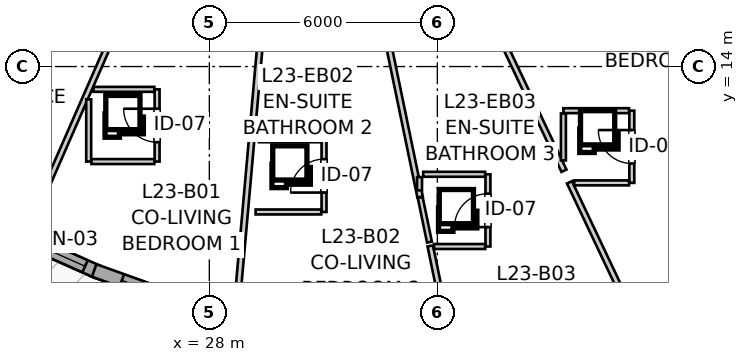
"""IFC4 building model, lengths in metres.
Left out: names, types, materials, properties, quantities, classifications, styles, units other than length and angle.
Written with IfcOpenShell. Run it as: python <this file> out.ifc"""

import sys

from ifc_helpers import new_model, si_unit, direction, frame, frame_2d, origin, place, context, subcontext, project, spatial, rectangle, extrude, source, transform, mapped, element, fill, save


model = new_model("IFC4")
c1 = context("Model", 3, precision=1e-05, world=origin(), true_north=direction((0.0, 1.0)))
c2 = subcontext(c1, "Body", "Model", "MODEL_VIEW")
j1 = project(units=[si_unit("LENGTHUNIT", "METRE"), si_unit("PLANEANGLEUNIT", "RADIAN")], contexts=[c1])
p1 = place(None, origin())
s1 = spatial("IfcSite", under=j1, at=p1, CompositionType="ELEMENT")
p2 = place(p1, origin())
s2 = spatial("IfcBuilding", under=s1, at=p2, CompositionType="ELEMENT")
p3 = place(p2, frame((0.0, 0.0, 80.0)))
s3 = spatial("IfcBuildingStorey", under=s2, at=p3, CompositionType="ELEMENT", Elevation=80.0)
p4 = place(p3, frame((22.503, 9.737, 0.0), z_axis=(0.0, 0.0, 1.0), x_axis=(0.913443049169, -0.406966578388, 0.0)))
e1 = element("IfcWall", 1, at=p4, inside=s3, PredefinedType="SOLIDWALL", context=c2, shape_type="SweptSolid", body=[
    extrude(rectangle(XDim=2.79, YDim=0.35, at=frame_2d((1.395, 0.0))), origin(), (0.0, 0.0, 1.0), 2.465),
])
p5 = place(p4, frame((0.938, 0.0, 0.82)))
e2 = element("IfcOpeningElement", 2, at=p5, cuts=e1, PredefinedType="OPENING", context=c2, shape_type="SweptSolid", body=[
    extrude(rectangle(XDim=1.5, YDim=1.45, at=frame_2d((0.75, 0.725))), frame((0.0, 0.185, 0.0), z_axis=(0.0, -1.0, 0.0), x_axis=(1.0, 0.0, 0.0)), (0.0, 0.0, 1.0), 0.37),
])
p6 = place(p3, frame((24.969, 8.635, 0.0), z_axis=(0.0, 0.0, 1.0), x_axis=(0.941099972293, -0.338128440315, 0.0)))
e3 = element("IfcWall", 3, at=p6, inside=s3, PredefinedType="SOLIDWALL", context=c2, shape_type="SweptSolid", body=[
    extrude(rectangle(XDim=3.028, YDim=0.35, at=frame_2d((1.514, 0.0))), origin(), (0.0, 0.0, 1.0), 2.465),
])
p7 = place(p6, frame((0.774, 0.0, 0.82)))
e4 = element("IfcOpeningElement", 4, at=p7, cuts=e3, PredefinedType="OPENING", context=c2, shape_type="SweptSolid", body=[
    extrude(rectangle(XDim=1.5, YDim=1.45, at=frame_2d((0.75, 0.725))), frame((0.0, 0.185, 0.0), z_axis=(0.0, -1.0, 0.0), x_axis=(1.0, 0.0, 0.0)), (0.0, 0.0, 1.0), 0.37),
])
p8 = place(p3, frame((26.625, 11.5, 0.0), z_axis=(0.0, 0.0, 1.0), x_axis=(0.0, 1.0, 0.0)))
e5 = element("IfcWall", 5, at=p8, inside=s3, PredefinedType="PARTITIONING", context=c2, shape_type="SweptSolid", body=[
    extrude(rectangle(XDim=1.9, YDim=0.13, at=frame_2d((0.95, 0.0))), origin(), (0.0, 0.0, 1.0), 2.935),
])
p9 = place(p8, frame((0.51, 0.0, 0.0)))
e6 = element("IfcOpeningElement", 6, at=p9, cuts=e5, PredefinedType="OPENING", context=c2, shape_type="SweptSolid", body=[
    extrude(rectangle(XDim=0.88, YDim=2.05, at=frame_2d((0.44, 1.025))), frame((0.0, 0.075, 0.0), z_axis=(0.0, -1.0, 0.0), x_axis=(1.0, 0.0, 0.0)), (0.0, 0.0, 1.0), 0.15),
])
p10 = place(p3, frame((31.018, 10.174, 0.0), z_axis=(0.0, 0.0, 1.0), x_axis=(0.0, 1.0, 0.0)))
e7 = element("IfcWall", 7, at=p10, inside=s3, PredefinedType="PARTITIONING", context=c2, shape_type="SweptSolid", body=[
    extrude(rectangle(XDim=1.9, YDim=0.13, at=frame_2d((0.95, 0.0))), origin(), (0.0, 0.0, 1.0), 2.935),
])
p11 = place(p10, frame((0.51, 0.0, 0.0)))
e8 = element("IfcOpeningElement", 8, at=p11, cuts=e7, PredefinedType="OPENING", context=c2, shape_type="SweptSolid", body=[
    extrude(rectangle(XDim=0.88, YDim=2.05, at=frame_2d((0.44, 1.025))), frame((0.0, 0.075, 0.0), z_axis=(0.0, -1.0, 0.0), x_axis=(1.0, 0.0, 0.0)), (0.0, 0.0, 1.0), 0.15),
])
p12 = place(p3, frame((39.117, 10.939, 0.0), z_axis=(0.0, 0.0, 1.0), x_axis=(0.0, 1.0, 0.0)))
e9 = element("IfcWall", 9, at=p12, inside=s3, PredefinedType="PARTITIONING", context=c2, shape_type="SweptSolid", body=[
    extrude(rectangle(XDim=1.9, YDim=0.13, at=frame_2d((0.95, 0.0))), origin(), (0.0, 0.0, 1.0), 2.935),
])
p13 = place(p12, frame((0.51, 0.0, 0.0)))
e10 = element("IfcOpeningElement", 10, at=p13, cuts=e9, PredefinedType="OPENING", context=c2, shape_type="SweptSolid", body=[
    extrude(rectangle(XDim=0.88, YDim=2.05, at=frame_2d((0.44, 1.025))), frame((0.0, 0.075, 0.0), z_axis=(0.0, -1.0, 0.0), x_axis=(1.0, 0.0, 0.0)), (0.0, 0.0, 1.0), 0.15),
])
p14 = place(p3, frame((35.331, 9.265, 0.0), z_axis=(0.0, 0.0, 1.0), x_axis=(0.0, 1.0, 0.0)))
e11 = element("IfcWall", 11, at=p14, inside=s3, PredefinedType="PARTITIONING", context=c2, shape_type="SweptSolid", body=[
    extrude(rectangle(XDim=1.9, YDim=0.13, at=frame_2d((0.95, 0.0))), origin(), (0.0, 0.0, 1.0), 2.935),
])
p15 = place(p14, frame((0.51, 0.0, 0.0)))
e12 = element("IfcOpeningElement", 12, at=p15, cuts=e11, PredefinedType="OPENING", context=c2, shape_type="SweptSolid", body=[
    extrude(rectangle(XDim=0.88, YDim=2.05, at=frame_2d((0.44, 1.025))), frame((0.0, 0.075, 0.0), z_axis=(0.0, -1.0, 0.0), x_axis=(1.0, 0.0, 0.0)), (0.0, 0.0, 1.0), 0.15),
])
p16 = place(p3, frame((28.711, 7.564, 0.0), z_axis=(0.0, 0.0, 1.0), x_axis=(0.088615013812, 0.996065951294, 0.0)))
e13 = element("IfcWall", 13, at=p16, inside=s3, PredefinedType="PARTITIONING", context=c2, shape_type="SweptSolid", body=[
    extrude(rectangle(XDim=7.943, YDim=0.145, at=frame_2d((3.971, 0.0))), origin(), (0.0, 0.0, 1.0), 2.935),
])
p17 = place(p3, frame((23.186, 9.634, 0.0), z_axis=(0.0, 0.0, 1.0), x_axis=(0.400994208685, 0.916080588486, 0.0)))
e14 = element("IfcWall", 14, at=p17, inside=s3, PredefinedType="PARTITIONING", context=c2, shape_type="SweptSolid", body=[
    extrude(rectangle(XDim=6.353, YDim=0.145, at=frame_2d((3.177, 0.0))), origin(), (0.0, 0.0, 1.0), 2.935),
])
p18 = place(p3, frame((38.667, 17.429, 0.0), z_axis=(0.0, 0.0, 1.0), x_axis=(0.696417222112, -0.717637131666, 0.0)))
e15 = element("IfcWall", 15, at=p18, inside=s3, PredefinedType="PARTITIONING", context=c2, shape_type="SweptSolid", body=[
    extrude(rectangle(XDim=6.04, YDim=0.145, at=frame_2d((3.02, 0.0))), origin(), (0.0, 0.0, 1.0), 2.935),
])
p19 = place(p3, frame((32.531, 15.468, 0.0), z_axis=(0.0, 0.0, 1.0), x_axis=(0.202792769077, -0.979221677053, 0.0)))
e16 = element("IfcWall", 16, at=p19, inside=s3, PredefinedType="PARTITIONING", context=c2, shape_type="SweptSolid", body=[
    extrude(rectangle(XDim=5.003, YDim=0.145, at=frame_2d((2.502, 0.0))), origin(), (0.0, 0.0, 1.0), 2.935),
])
p20 = place(p3, frame((37.476, 10.954, 0.0), z_axis=(0.0, 0.0, 1.0), x_axis=(0.428094746621, -0.903733859007, 0.0)))
e17 = element("IfcWall", 17, at=p20, inside=s3, PredefinedType="PARTITIONING", context=c2, shape_type="SweptSolid", body=[
    extrude(rectangle(XDim=4.996, YDim=0.145, at=frame_2d((2.498, 0.0))), origin(), (0.0, 0.0, 1.0), 2.935),
])
p21 = place(p3, frame((35.346, 15.452, 0.0), z_axis=(0.0, 0.0, 1.0), x_axis=(0.428023015228, -0.903767834366, 0.0)))
e18 = element("IfcWall", 18, at=p21, inside=s3, PredefinedType="PARTITIONING", context=c2, shape_type="SweptSolid", body=[
    extrude(rectangle(XDim=4.64, YDim=0.145, at=frame_2d((2.32, 0.0))), origin(), (0.0, 0.0, 1.0), 2.935),
])
p22 = place(p3, frame((33.813, 9.28, 0.0), z_axis=(0.0, 0.0, 1.0), x_axis=(0.202648062782, -0.979251633979, 0.0)))
e19 = element("IfcWall", 19, at=p22, inside=s3, PredefinedType="PARTITIONING", context=c2, shape_type="SweptSolid", body=[
    extrude(rectangle(XDim=3.232, YDim=0.145, at=frame_2d((1.616, 0.0))), origin(), (0.0, 0.0, 1.0), 2.935),
])
p23 = place(p3, frame((24.825, 11.5, 0.0), z_axis=(0.0, 0.0, 1.0), x_axis=(0.0, 1.0, 0.0)))
e20 = element("IfcWall", 20, at=p23, inside=s3, PredefinedType="PARTITIONING", context=c2, shape_type="SweptSolid", body=[
    extrude(rectangle(XDim=1.637, YDim=0.13, at=frame_2d((0.818, 0.0))), origin(), (0.0, 0.0, 1.0), 2.935),
])
p24 = place(p3, frame((33.626, 11.165, 0.0), z_axis=(0.0, 0.0, 1.0), x_axis=(1.0, 0.0, 0.0)))
e21 = element("IfcWall", 21, at=p24, inside=s3, PredefinedType="PARTITIONING", context=c2, shape_type="SweptSolid", body=[
    extrude(rectangle(XDim=1.632, YDim=0.13, at=frame_2d((0.816, 0.0))), origin(), (0.0, 0.0, 1.0), 2.935),
])
p25 = place(p3, frame((24.898, 11.5, 0.0), z_axis=(0.0, 0.0, 1.0), x_axis=(1.0, 0.0, 0.0)))
e22 = element("IfcWall", 22, at=p25, inside=s3, PredefinedType="PARTITIONING", context=c2, shape_type="SweptSolid", body=[
    extrude(rectangle(XDim=1.654, YDim=0.13, at=frame_2d((0.827, 0.0))), origin(), (0.0, 0.0, 1.0), 2.543),
])
p26 = place(p3, frame((29.305, 12.074, 0.0), z_axis=(0.0, 0.0, 1.0), x_axis=(1.0, 0.0, 0.0)))
e23 = element("IfcWall", 23, at=p26, inside=s3, PredefinedType="PARTITIONING", context=c2, shape_type="SweptSolid", body=[
    extrude(rectangle(XDim=1.64, YDim=0.13, at=frame_2d((0.82, 0.0))), origin(), (0.0, 0.0, 1.0), 2.935),
])
p27 = place(p3, frame((29.218, 10.174, 0.0), z_axis=(0.0, 0.0, 1.0), x_axis=(1.0, 0.0, 0.0)))
e24 = element("IfcWall", 24, at=p27, inside=s3, PredefinedType="PARTITIONING", context=c2, shape_type="SweptSolid", body=[
    extrude(rectangle(XDim=1.727, YDim=0.13, at=frame_2d((0.864, 0.0))), origin(), (0.0, 0.0, 1.0), 2.543),
])
p28 = place(p3, frame((37.317, 12.839, 0.0), z_axis=(0.0, 0.0, 1.0), x_axis=(1.0, 0.0, 0.0)))
e25 = element("IfcWall", 25, at=p28, inside=s3, PredefinedType="PARTITIONING", context=c2, shape_type="SweptSolid", body=[
    extrude(rectangle(XDim=1.727, YDim=0.13, at=frame_2d((0.864, 0.0))), origin(), (0.0, 0.0, 1.0), 2.935),
])
p29 = place(p3, frame((24.951, 13.4, 0.0), z_axis=(0.0, 0.0, 1.0), x_axis=(1.0, 0.0, 0.0)))
e26 = element("IfcWall", 26, at=p29, inside=s3, PredefinedType="PARTITIONING", context=c2, shape_type="SweptSolid", body=[
    extrude(rectangle(XDim=1.601, YDim=0.13, at=frame_2d((0.801, 0.0))), origin(), (0.0, 0.0, 1.0), 2.935),
])
p30 = place(p3, frame((37.602, 10.939, 0.0), z_axis=(0.0, 0.0, 1.0), x_axis=(1.0, 0.0, 0.0)))
e27 = element("IfcWall", 27, at=p30, inside=s3, PredefinedType="PARTITIONING", context=c2, shape_type="SweptSolid", body=[
    extrude(rectangle(XDim=1.442, YDim=0.13, at=frame_2d((0.721, 0.0))), origin(), (0.0, 0.0, 1.0), 2.935),
])
p31 = place(p3, frame((37.317, 11.53, 0.0), z_axis=(0.0, 0.0, 1.0), x_axis=(0.0, 1.0, 0.0)))
e28 = element("IfcWall", 28, at=p31, inside=s3, PredefinedType="PARTITIONING", context=c2, shape_type="SweptSolid", body=[
    extrude(rectangle(XDim=1.236, YDim=0.13, at=frame_2d((0.618, 0.0))), origin(), (0.0, 0.0, 1.0), 2.935),
])
p32 = place(p3, frame((33.912, 9.265, 0.0), z_axis=(0.0, 0.0, 1.0), x_axis=(1.0, 0.0, 0.0)))
e29 = element("IfcWall", 29, at=p32, inside=s3, PredefinedType="PARTITIONING", context=c2, shape_type="SweptSolid", body=[
    extrude(rectangle(XDim=1.346, YDim=0.13, at=frame_2d((0.673, 0.0))), origin(), (0.0, 0.0, 1.0), 2.935),
])
p33 = place(p3, frame((33.549, 10.553, 0.0), z_axis=(0.0, 0.0, 1.0), x_axis=(0.202855035592, -0.97920877985, 0.0)))
e30 = element("IfcWall", 30, at=p33, inside=s3, PredefinedType="PARTITIONING", context=c2, shape_type="SweptSolid", body=[
    extrude(rectangle(XDim=1.198, YDim=0.13, at=frame_2d((0.599, 0.0))), origin(), (0.0, 0.0, 1.0), 2.935),
])
p34 = place(p3, frame((33.531, 10.742, 0.0), z_axis=(0.0, 0.0, 1.0), x_axis=(0.0, 1.0, 0.0)))
e31 = element("IfcWall", 31, at=p34, inside=s3, PredefinedType="PARTITIONING", context=c2, shape_type="SweptSolid", body=[
    extrude(rectangle(XDim=0.35, YDim=0.13, at=frame_2d((0.175, 0.0))), origin(), (0.0, 0.0, 1.0), 2.935),
])
m1 = source(origin(), c2, "Body", "SweptSolid", [
    extrude(rectangle(XDim=1.5, YDim=1.45, at=frame_2d((0.75, 0.725))), frame((0.0, 0.03, 0.0), z_axis=(0.0, -1.0, 0.0), x_axis=(1.0, 0.0, 0.0)), (0.0, 0.0, 1.0), 0.06),
])
p35 = place(p5, origin())
e32 = element("IfcWindow", 32, at=p35, inside=s3, PartitioningType="SINGLE_PANEL", PredefinedType="WINDOW", context=c2, shape_type="MappedRepresentation", body=[
    mapped(m1, transform((0.0, 0.0, 0.0), x_axis=(1.0, 0.0, 0.0), y_axis=(0.0, 1.0, 0.0), z_axis=(0.0, 0.0, 1.0), scale=1.0)),
])
fill(e2, e32)
p36 = place(p7, origin())
e33 = element("IfcWindow", 33, at=p36, inside=s3, PartitioningType="SINGLE_PANEL", PredefinedType="WINDOW", context=c2, shape_type="MappedRepresentation", body=[
    mapped(m1, transform((0.0, 0.0, 0.0), x_axis=(1.0, 0.0, 0.0), y_axis=(0.0, 1.0, 0.0), z_axis=(0.0, 0.0, 1.0), scale=1.0)),
])
fill(e4, e33)
m2 = source(origin(), c2, "Body", "SweptSolid", [
    extrude(rectangle(XDim=0.88, YDim=2.05, at=frame_2d((0.44, 1.025))), frame((0.0, 0.025, 0.0), z_axis=(0.0, -1.0, 0.0), x_axis=(1.0, 0.0, 0.0)), (0.0, 0.0, 1.0), 0.05),
])
p37 = place(p9, origin())
e34 = element("IfcDoor", 34, at=p37, inside=s3, OperationType="SINGLE_SWING_RIGHT", PredefinedType="DOOR", context=c2, shape_type="MappedRepresentation", body=[
    mapped(m2, transform((0.0, 0.0, 0.0), x_axis=(1.0, 0.0, 0.0), y_axis=(0.0, 1.0, 0.0), z_axis=(0.0, 0.0, 1.0), scale=1.0)),
])
fill(e6, e34)
p38 = place(p11, origin())
e35 = element("IfcDoor", 35, at=p38, inside=s3, OperationType="SINGLE_SWING_LEFT", PredefinedType="DOOR", context=c2, shape_type="MappedRepresentation", body=[
    mapped(m2, transform((0.0, 0.0, 0.0), x_axis=(1.0, 0.0, 0.0), y_axis=(0.0, 1.0, 0.0), z_axis=(0.0, 0.0, 1.0), scale=1.0)),
])
fill(e8, e35)
p39 = place(p13, origin())
e36 = element("IfcDoor", 36, at=p39, inside=s3, OperationType="SINGLE_SWING_RIGHT", PredefinedType="DOOR", context=c2, shape_type="MappedRepresentation", body=[
    mapped(m2, transform((0.0, 0.0, 0.0), x_axis=(1.0, 0.0, 0.0), y_axis=(0.0, 1.0, 0.0), z_axis=(0.0, 0.0, 1.0), scale=1.0)),
])
fill(e10, e36)
p40 = place(p15, origin())
e37 = element("IfcDoor", 37, at=p40, inside=s3, OperationType="SINGLE_SWING_LEFT", PredefinedType="DOOR", context=c2, shape_type="MappedRepresentation", body=[
    mapped(m2, transform((0.0, 0.0, 0.0), x_axis=(1.0, 0.0, 0.0), y_axis=(0.0, 1.0, 0.0), z_axis=(0.0, 0.0, 1.0), scale=1.0)),
])
fill(e12, e37)
save(model, sys.argv[1])
